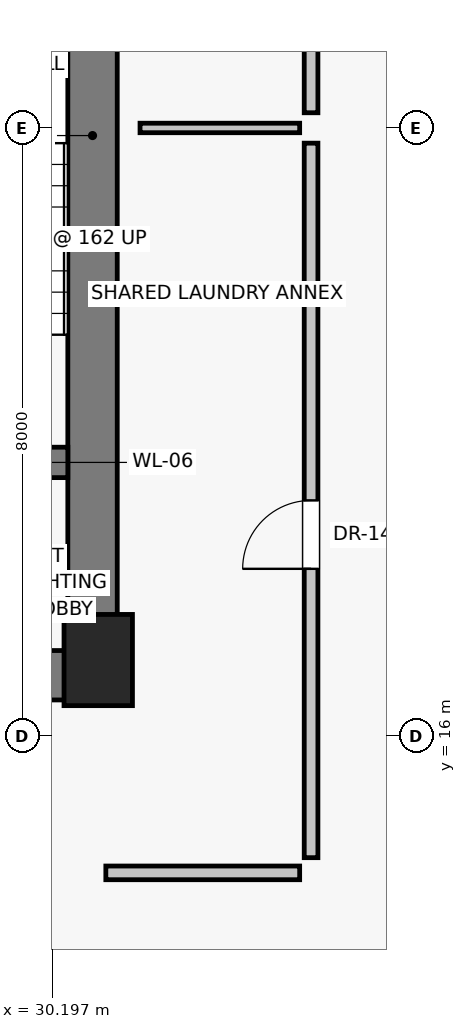
"""IFC4 building model, lengths in metres.
Left out: names, types, materials, properties, quantities, classifications, styles, units other than length and angle.
Written with IfcOpenShell. Run it as: python <this file> out.ifc"""

import sys

from ifc_helpers import new_model, si_unit, direction, frame, frame_2d, origin, origin_2d, place, context, subcontext, project, spatial, rectangle, extrude, source, transform, mapped, element, fill, save


model = new_model("IFC4")
c1 = context("Model", 3, precision=1e-05, world=origin(), true_north=direction((0.0, 1.0)))
c2 = subcontext(c1, "Body", "Model", "MODEL_VIEW")
j1 = project(units=[si_unit("LENGTHUNIT", "METRE"), si_unit("PLANEANGLEUNIT", "RADIAN")], contexts=[c1])
p1 = place(None, origin())
s1 = spatial("IfcSite", under=j1, at=p1, CompositionType="ELEMENT")
p2 = place(p1, origin())
s2 = spatial("IfcBuilding", under=s1, at=p2, CompositionType="ELEMENT")
p3 = place(p2, frame((0.0, 0.0, 129.5)))
s3 = spatial("IfcBuildingStorey", under=s2, at=p3, CompositionType="ELEMENT", Elevation=129.5)
p4 = place(p3, frame((30.8, 17.0, 0.0), z_axis=(0.0, 0.0, 1.0), x_axis=(1.0, 0.0, 0.0)))
e1 = element("IfcColumn", 1, at=p4, inside=s3, PredefinedType="PILASTER", context=c2, shape_type="SweptSolid", body=[
    extrude(rectangle(XDim=0.9, YDim=1.2, at=origin_2d()), origin(), (0.0, 0.0, 1.0), 3.25),
])
p5 = place(p3, frame((30.725, 16.8, 0.0), z_axis=(0.0, 0.0, 1.0), x_axis=(0.0, 1.0, 0.0)))
e2 = element("IfcWall", 2, at=p5, inside=s3, PredefinedType="SHEAR", context=c2, shape_type="SweptSolid", body=[
    extrude(rectangle(XDim=14.2, YDim=0.65, at=frame_2d((7.1, 0.0))), origin(), (0.0, 0.0, 1.0), 3.0),
])
p6 = place(p3, frame((24.95, 16.8, 0.0), z_axis=(0.0, 0.0, 1.0), x_axis=(1.0, 0.0, 0.0)))
e3 = element("IfcWall", 3, at=p6, inside=s3, PredefinedType="SHEAR", context=c2, shape_type="SweptSolid", body=[
    extrude(rectangle(XDim=5.85, YDim=0.65, at=frame_2d((2.925, 0.0))), origin(), (0.0, 0.0, 1.0), 3.0),
])
p7 = place(p6, frame((2.15, 0.0, 0.0)))
e4 = element("IfcOpeningElement", 4, at=p7, cuts=e3, PredefinedType="OPENING", context=c2, shape_type="SweptSolid", body=[
    extrude(rectangle(XDim=1.2, YDim=2.03, at=frame_2d((0.6, 1.015))), frame((0.0, 0.335, 0.0), z_axis=(0.0, -1.0, 0.0), x_axis=(1.0, 0.0, 0.0)), (0.0, 0.0, 1.0), 0.67),
])
p8 = place(p3, frame((27.0, 19.6, 0.0), z_axis=(0.0, 0.0, 1.0), x_axis=(1.0, 0.0, 0.0)))
e5 = element("IfcWall", 5, at=p8, inside=s3, PredefinedType="SHEAR", context=c2, shape_type="SweptSolid", body=[
    extrude(rectangle(XDim=3.4, YDim=0.4, at=frame_2d((1.7, 0.0))), origin(), (0.0, 0.0, 1.0), 3.0),
])
p9 = place(p8, frame((1.05, 0.0, 0.0)))
e6 = element("IfcOpeningElement", 6, at=p9, cuts=e5, PredefinedType="OPENING", context=c2, shape_type="SweptSolid", body=[
    extrude(rectangle(XDim=1.1, YDim=2.03, at=frame_2d((0.55, 1.015))), frame((0.0, 0.21, 0.0), z_axis=(0.0, -1.0, 0.0), x_axis=(1.0, 0.0, 0.0)), (0.0, 0.0, 1.0), 0.42),
])
p10 = place(p3, frame((33.6, 14.4, 0.0), z_axis=(0.0, 0.0, 1.0), x_axis=(0.0, 1.0, 0.0)))
e7 = element("IfcWall", 7, at=p10, inside=s3, PredefinedType="PARTITIONING", context=c2, shape_type="SweptSolid", body=[
    extrude(rectangle(XDim=9.4, YDim=0.18, at=frame_2d((4.7, 0.0))), origin(), (0.0, 0.0, 1.0), 3.0),
])
p11 = place(p10, frame((3.8, 0.0, 0.0)))
e8 = element("IfcOpeningElement", 8, at=p11, cuts=e7, PredefinedType="OPENING", context=c2, shape_type="SweptSolid", body=[
    extrude(rectangle(XDim=0.9, YDim=2.01, at=frame_2d((0.45, 1.005))), frame((0.0, 0.1, 0.0), z_axis=(0.0, -1.0, 0.0), x_axis=(1.0, 0.0, 0.0)), (0.0, 0.0, 1.0), 0.2),
])
p12 = place(p3, frame((33.6, 24.2, 0.0), z_axis=(0.0, 0.0, 1.0), x_axis=(0.0, 1.0, 0.0)))
e9 = element("IfcWall", 9, at=p12, inside=s3, PredefinedType="PARTITIONING", context=c2, shape_type="SweptSolid", body=[
    extrude(rectangle(XDim=9.2, YDim=0.18, at=frame_2d((4.6, 0.0))), origin(), (0.0, 0.0, 1.0), 3.0),
])
p13 = place(p12, frame((3.8, 0.0, 0.0)))
e10 = element("IfcOpeningElement", 10, at=p13, cuts=e9, PredefinedType="OPENING", context=c2, shape_type="SweptSolid", body=[
    extrude(rectangle(XDim=0.9, YDim=2.01, at=frame_2d((0.45, 1.005))), frame((0.0, 0.1, 0.0), z_axis=(0.0, -1.0, 0.0), x_axis=(1.0, 0.0, 0.0)), (0.0, 0.0, 1.0), 0.2),
])
p14 = place(p3, frame((31.35, 24.0, 0.0), z_axis=(0.0, 0.0, 1.0), x_axis=(1.0, 0.0, 0.0)))
e11 = element("IfcWall", 11, at=p14, inside=s3, PredefinedType="PARTITIONING", context=c2, shape_type="SweptSolid", body=[
    extrude(rectangle(XDim=2.1, YDim=0.125, at=frame_2d((1.05, 0.0))), origin(), (0.0, 0.0, 1.0), 3.0),
])
p15 = place(p3, frame((30.9, 14.2, 0.0), z_axis=(0.0, 0.0, 1.0), x_axis=(1.0, 0.0, 0.0)))
e12 = element("IfcWall", 12, at=p15, inside=s3, PredefinedType="PARTITIONING", context=c2, shape_type="SweptSolid", body=[
    extrude(rectangle(XDim=2.55, YDim=0.18, at=frame_2d((1.275, 0.0))), origin(), (0.0, 0.0, 1.0), 3.0),
])
m1 = source(origin(), c2, "Body", "SweptSolid", [
    extrude(rectangle(XDim=0.9, YDim=2.01, at=frame_2d((0.45, 1.005))), frame((0.0, 0.025, 0.0), z_axis=(0.0, -1.0, 0.0), x_axis=(1.0, 0.0, 0.0)), (0.0, 0.0, 1.0), 0.05),
])
p16 = place(p11, origin())
e13 = element("IfcDoor", 13, at=p16, inside=s3, OperationType="SINGLE_SWING_LEFT", PredefinedType="DOOR", context=c2, shape_type="MappedRepresentation", body=[
    mapped(m1, transform((0.0, 0.0, 0.0), scale=1.0)),
])
fill(e8, e13)
save(model, sys.argv[1])
